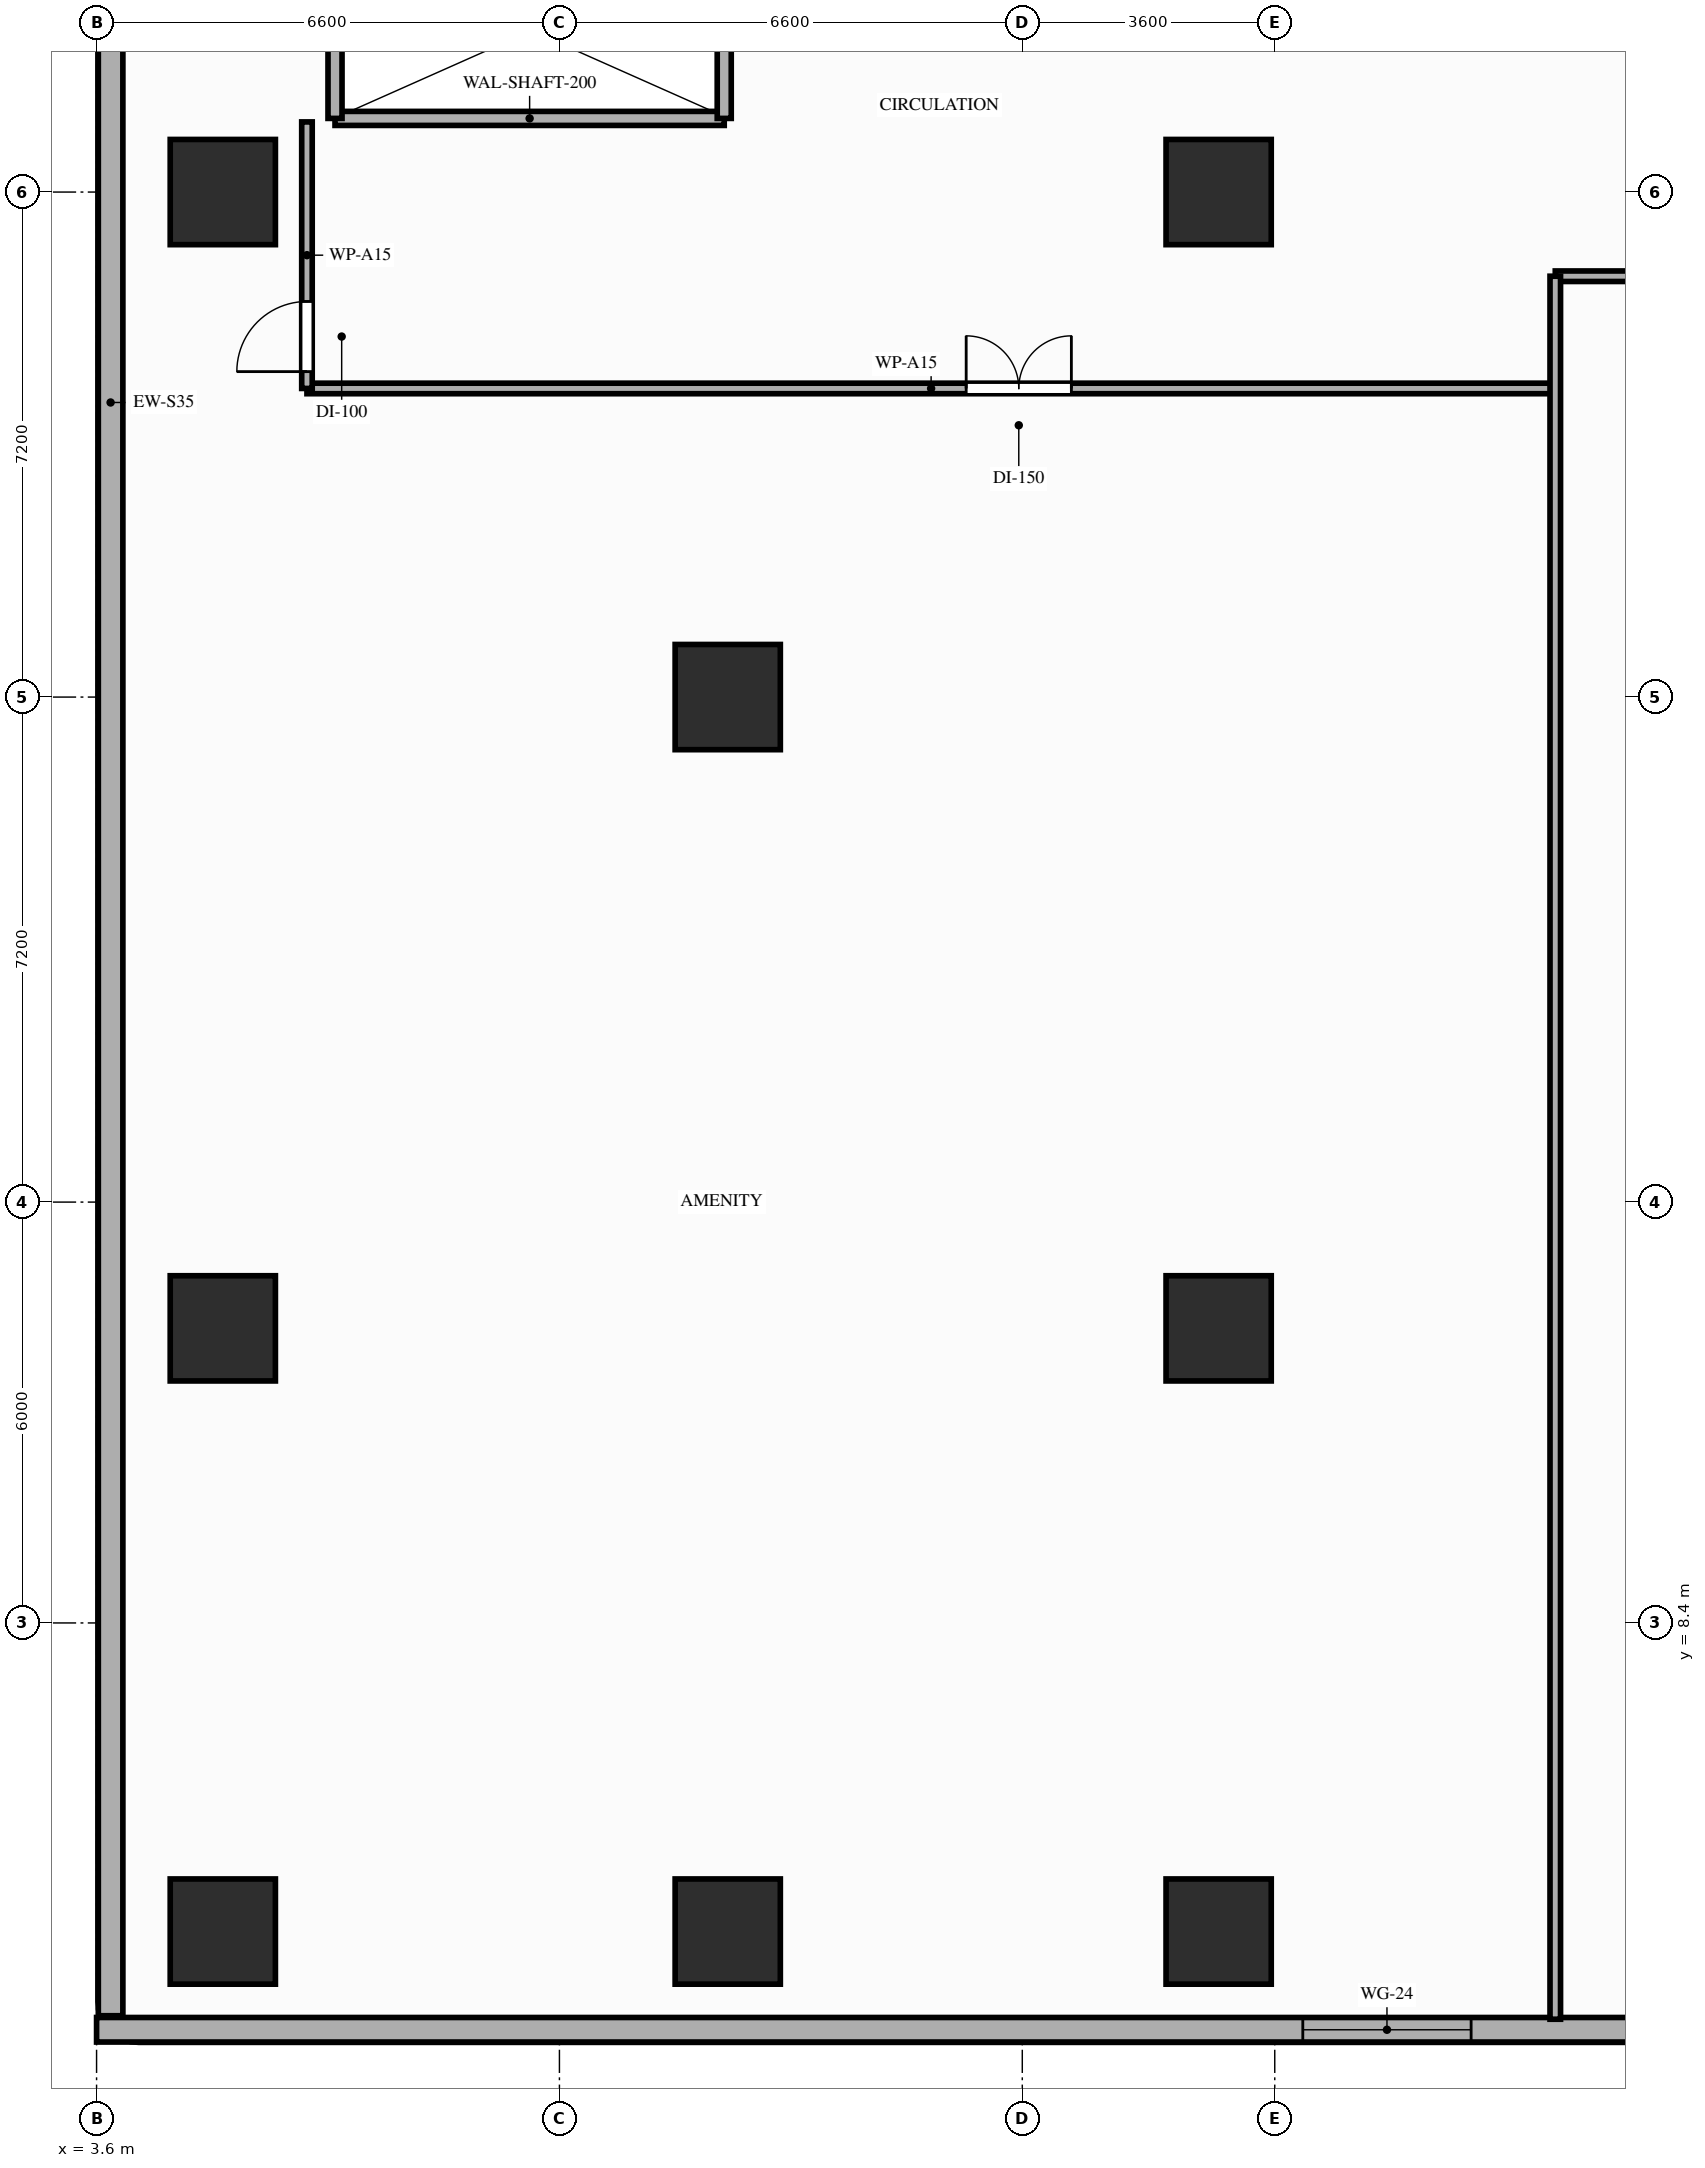
"""IFC4 building model, lengths in metres.
Left out: names, types, materials, properties, quantities, classifications, styles, units other than length and angle.
Written with IfcOpenShell. Run it as: python <this file> out.ifc"""

import sys

from ifc_helpers import new_model, si_unit, direction, frame, frame_2d, origin, origin_2d, place, context, subcontext, project, spatial, rectangle, extrude, element, fill, save


model = new_model("IFC4")
c1 = context("Model", 3, precision=1e-05, world=origin(), true_north=direction((0.0, 1.0)))
c2 = subcontext(c1, "Body", "Model", "MODEL_VIEW")
j1 = project(units=[si_unit("LENGTHUNIT", "METRE"), si_unit("PLANEANGLEUNIT", "RADIAN")], contexts=[c1])
p1 = place(None, origin())
s1 = spatial("IfcSite", under=j1, at=p1, CompositionType="ELEMENT")
p2 = place(p1, origin())
s2 = spatial("IfcBuilding", under=s1, at=p2, CompositionType="ELEMENT")
p3 = place(p2, frame((0.0, 0.0, 17.6)))
s3 = spatial("IfcBuildingStorey", under=s2, at=p3, CompositionType="ELEMENT", Elevation=17.6)
for number, where, z_axis, x_axis in (
    (1, (5.4, 12.6, 0.0), (0.0, 0.0, 1.0), (1.0, 0.0, 0.0)),
    (2, (19.6, 12.6, 0.0), (0.0, 0.0, 1.0), (1.0, 0.0, 0.0)),
    (3, (5.4, 28.8, 0.0), (0.0, 0.0, 1.0), (1.0, 0.0, 0.0)),
    (4, (19.6, 28.8, 0.0), (0.0, 0.0, 1.0), (1.0, 0.0, 0.0)),
    (5, (5.4, 4.0, 0.0), (0.0, 0.0, 1.0), (1.0, 0.0, 0.0)),
    (6, (12.6, 4.0, 0.0), (0.0, 0.0, 1.0), (1.0, 0.0, 0.0)),
    (7, (19.6, 4.0, 0.0), (0.0, 0.0, 1.0), (1.0, 0.0, 0.0)),
    (8, (12.6, 21.6, 0.0), (0.0, 0.0, 1.0), (1.0, 0.0, 0.0)),
):
    element("IfcColumn", number, at=place(p3, frame(where, z_axis=z_axis, x_axis=x_axis)), inside=s3, PredefinedType="COLUMN", context=c2, shape_type="SweptSolid", body=[
        extrude(rectangle(XDim=1.5, YDim=1.5, at=origin_2d()), origin(), (0.0, 0.0, 1.0), 4.2),
    ])
p4 = place(p3, frame((3.6, 2.6, 0.0), z_axis=(0.0, 0.0, 1.0), x_axis=(1.0, 0.0, 0.0)))
e9 = element("IfcWall", 9, at=p4, inside=s3, PredefinedType="STANDARD", context=c2, shape_type="SweptSolid", body=[
    extrude(rectangle(XDim=69.6, YDim=0.35, at=frame_2d((34.8, 0.0))), origin(), (0.0, 0.0, 1.0), 3.9),
])
p5 = place(p4, frame((17.2, 0.0, 0.9)))
e10 = element("IfcOpeningElement", 10, at=p5, cuts=e9, PredefinedType="OPENING", context=c2, shape_type="SweptSolid", body=[
    extrude(rectangle(XDim=2.4, YDim=2.15, at=frame_2d((1.2, 1.075))), frame((0.0, 0.185, 0.0), z_axis=(0.0, -1.0, 0.0), x_axis=(1.0, 0.0, 0.0)), (0.0, 0.0, 1.0), 0.37),
])
p6 = place(p4, frame((24.6, 0.0, 0.9)))
e11 = element("IfcOpeningElement", 11, at=p6, cuts=e9, PredefinedType="OPENING", context=c2, shape_type="SweptSolid", body=[
    extrude(rectangle(XDim=2.4, YDim=2.15, at=frame_2d((1.2, 1.075))), frame((0.0, 0.185, 0.0), z_axis=(0.0, -1.0, 0.0), x_axis=(1.0, 0.0, 0.0)), (0.0, 0.0, 1.0), 0.37),
])
p7 = place(p4, frame((36.2, 0.0, 0.9)))
e12 = element("IfcOpeningElement", 12, at=p7, cuts=e9, PredefinedType="OPENING", context=c2, shape_type="SweptSolid", body=[
    extrude(rectangle(XDim=2.4, YDim=2.15, at=frame_2d((1.2, 1.075))), frame((0.0, 0.185, 0.0), z_axis=(0.0, -1.0, 0.0), x_axis=(1.0, 0.0, 0.0)), (0.0, 0.0, 1.0), 0.37),
])
p8 = place(p4, frame((48.4, 0.0, 0.9)))
e13 = element("IfcOpeningElement", 13, at=p8, cuts=e9, PredefinedType="OPENING", context=c2, shape_type="SweptSolid", body=[
    extrude(rectangle(XDim=2.4, YDim=2.15, at=frame_2d((1.2, 1.075))), frame((0.0, 0.185, 0.0), z_axis=(0.0, -1.0, 0.0), x_axis=(1.0, 0.0, 0.0)), (0.0, 0.0, 1.0), 0.37),
])
p9 = place(p4, frame((64.0, 0.0, 0.9)))
e14 = element("IfcOpeningElement", 14, at=p9, cuts=e9, PredefinedType="OPENING", context=c2, shape_type="SweptSolid", body=[
    extrude(rectangle(XDim=2.4, YDim=2.15, at=frame_2d((1.2, 1.075))), frame((0.0, 0.185, 0.0), z_axis=(0.0, -1.0, 0.0), x_axis=(1.0, 0.0, 0.0)), (0.0, 0.0, 1.0), 0.37),
])
p10 = place(p3, frame((3.8, 48.8, 0.0), z_axis=(0.0, 0.0, 1.0), x_axis=(0.0, -1.0, 0.0)))
e15 = element("IfcWall", 15, at=p10, inside=s3, PredefinedType="STANDARD", context=c2, shape_type="SweptSolid", body=[
    extrude(rectangle(XDim=46.0, YDim=0.35, at=frame_2d((23.0, 0.0))), origin(), (0.0, 0.0, 1.0), 3.9),
])
p11 = place(p3, frame((7.0, 29.85, 0.0), z_axis=(0.0, 0.0, 1.0), x_axis=(1.0, 0.0, 0.0)))
e16 = element("IfcWall", 16, at=p11, inside=s3, PredefinedType="MOVABLE", context=c2, shape_type="SweptSolid", body=[
    extrude(rectangle(XDim=5.55, YDim=0.2, at=frame_2d((2.775, 0.0))), origin(), (0.0, 0.0, 1.0), 3.9),
])
for number, where, z_axis, x_axis in (
    (17, (7.0, 29.85, 0.0), (0.0, 0.0, 1.0), (0.0, 1.0, 0.0)),
    (18, (12.55, 29.85, 0.0), (0.0, 0.0, 1.0), (0.0, 1.0, 0.0)),
):
    element("IfcWall", number, at=place(p3, frame(where, z_axis=z_axis, x_axis=x_axis)), inside=s3, PredefinedType="MOVABLE", context=c2, shape_type="SweptSolid", body=[
        extrude(rectangle(XDim=2.5, YDim=0.2, at=frame_2d((1.25, 0.0))), origin(), (0.0, 0.0, 1.0), 3.9),
    ])
p12 = place(p3, frame((6.6, 26.0, 0.0), z_axis=(0.0, 0.0, 1.0), x_axis=(1.0, 0.0, 0.0)))
e19 = element("IfcWall", 19, at=p12, inside=s3, PredefinedType="PARTITIONING", context=c2, shape_type="SweptSolid", body=[
    extrude(rectangle(XDim=17.8, YDim=0.15, at=frame_2d((8.9, 0.0))), origin(), (0.0, 0.0, 1.0), 3.18),
])
p13 = place(p12, frame((9.4, 0.0, 0.0)))
e20 = element("IfcOpeningElement", 20, at=p13, cuts=e19, PredefinedType="OPENING", context=c2, shape_type="SweptSolid", body=[
    extrude(rectangle(XDim=1.5, YDim=2.18, at=frame_2d((0.75, 1.09))), frame((0.0, 0.085, 0.0), z_axis=(0.0, -1.0, 0.0), x_axis=(1.0, 0.0, 0.0)), (0.0, 0.0, 1.0), 0.17),
])
p14 = place(p3, frame((24.4, 27.6, 0.0), z_axis=(0.0, 0.0, 1.0), x_axis=(1.0, 0.0, 0.0)))
e21 = element("IfcWall", 21, at=p14, inside=s3, PredefinedType="PARTITIONING", context=c2, shape_type="SweptSolid", body=[
    extrude(rectangle(XDim=26.4, YDim=0.15, at=frame_2d((13.2, 0.0))), origin(), (0.0, 0.0, 1.0), 3.18),
])
p15 = place(p14, frame((7.6, 0.0, 0.0)))
e22 = element("IfcOpeningElement", 22, at=p15, cuts=e21, PredefinedType="OPENING", context=c2, shape_type="SweptSolid", body=[
    extrude(rectangle(XDim=1.5, YDim=2.18, at=frame_2d((0.75, 1.09))), frame((0.0, 0.085, 0.0), z_axis=(0.0, -1.0, 0.0), x_axis=(1.0, 0.0, 0.0)), (0.0, 0.0, 1.0), 0.17),
])
p16 = place(p3, frame((6.6, 26.0, 0.0), z_axis=(0.0, 0.0, 1.0), x_axis=(0.0, 1.0, 0.0)))
e23 = element("IfcWall", 23, at=p16, inside=s3, PredefinedType="PARTITIONING", context=c2, shape_type="SweptSolid", body=[
    extrude(rectangle(XDim=3.8, YDim=0.15, at=frame_2d((1.9, 0.0))), origin(), (0.0, 0.0, 1.0), 3.18),
])
p17 = place(p16, frame((0.24, 0.0, 0.0)))
e24 = element("IfcOpeningElement", 24, at=p17, cuts=e23, PredefinedType="OPENING", context=c2, shape_type="SweptSolid", body=[
    extrude(rectangle(XDim=1.0, YDim=2.15, at=frame_2d((0.5, 1.075))), frame((0.0, 0.085, 0.0), z_axis=(0.0, -1.0, 0.0), x_axis=(1.0, 0.0, 0.0)), (0.0, 0.0, 1.0), 0.17),
])
p18 = place(p3, frame((24.4, 2.75, 0.0), z_axis=(0.0, 0.0, 1.0), x_axis=(0.0, 1.0, 0.0)))
e25 = element("IfcWall", 25, at=p18, inside=s3, PredefinedType="PARTITIONING", context=c2, shape_type="SweptSolid", body=[
    extrude(rectangle(XDim=24.85, YDim=0.15, at=frame_2d((12.425, 0.0))), origin(), (0.0, 0.0, 1.0), 3.9),
])
p19 = place(p5, origin())
e26 = element("IfcWindow", 26, at=p19, inside=s3, PartitioningType="SINGLE_PANEL", PredefinedType="WINDOW", context=c2, shape_type="SweptSolid", body=[
    extrude(rectangle(XDim=2.4, YDim=2.15, at=frame_2d((1.2, 1.075))), frame((0.0, 0.03, 0.0), z_axis=(0.0, -1.0, 0.0), x_axis=(1.0, 0.0, 0.0)), (0.0, 0.0, 1.0), 0.06),
])
fill(e10, e26)
p20 = place(p17, origin())
e27 = element("IfcDoor", 27, at=p20, inside=s3, OperationType="SINGLE_SWING_LEFT", PredefinedType="DOOR", context=c2, shape_type="SweptSolid", body=[
    extrude(rectangle(XDim=1.0, YDim=2.15, at=frame_2d((0.5, 1.075))), frame((0.0, 0.025, 0.0), z_axis=(0.0, -1.0, 0.0), x_axis=(1.0, 0.0, 0.0)), (0.0, 0.0, 1.0), 0.05),
])
fill(e24, e27)
p21 = place(p13, origin())
e28 = element("IfcDoor", 28, at=p21, inside=s3, OperationType="DOUBLE_DOOR_SINGLE_SWING", PredefinedType="DOOR", context=c2, shape_type="SweptSolid", body=[
    extrude(rectangle(XDim=1.5, YDim=2.18, at=frame_2d((0.75, 1.09))), frame((0.0, 0.025, 0.0), z_axis=(0.0, -1.0, 0.0), x_axis=(1.0, 0.0, 0.0)), (0.0, 0.0, 1.0), 0.05),
])
fill(e20, e28)
save(model, sys.argv[1])
